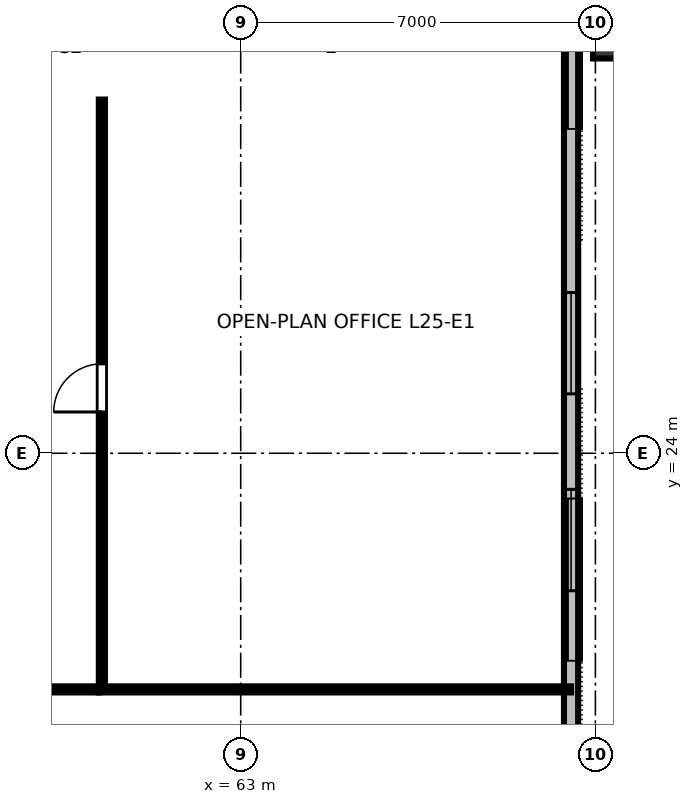
"""IFC4 building model, lengths in metres.
Left out: names, types, materials, properties, quantities, classifications, styles, units other than length and angle.
Written with IfcOpenShell. Run it as: python <this file> out.ifc"""

import sys

from ifc_helpers import new_model, si_unit, direction, frame, frame_2d, origin, origin_2d, place, context, subcontext, project, spatial, rectangle, i_section, extrude, element, fill, save


model = new_model("IFC4")
c1 = context("Model", 3, precision=1e-05, world=origin(), true_north=direction((0.0, 1.0)))
c2 = subcontext(c1, "Body", "Model", "MODEL_VIEW")
j1 = project(units=[si_unit("LENGTHUNIT", "METRE"), si_unit("PLANEANGLEUNIT", "RADIAN")], contexts=[c1])
p1 = place(None, origin())
s1 = spatial("IfcSite", under=j1, at=p1, CompositionType="ELEMENT")
p2 = place(p1, origin())
s2 = spatial("IfcBuilding", under=s1, at=p2, CompositionType="ELEMENT")
p3 = place(p2, frame((0.0, 0.0, 98.8)))
s3 = spatial("IfcBuildingStorey", under=s2, at=p3, CompositionType="ELEMENT", Elevation=98.8)
p4 = place(p3, frame((70.18, 32.0, 0.0), z_axis=(0.0, 0.0, 1.0), x_axis=(0.0, 1.0, 0.0)))
e1 = element("IfcColumn", 1, at=p4, inside=s3, PredefinedType="COLUMN", context=c2, shape_type="SweptSolid", body=[
    extrude(i_section(OverallWidth=0.418, OverallDepth=0.455, WebThickness=0.042, FlangeThickness=0.068, FilletRadius=0.025, at=origin_2d()), origin(), (0.0, 0.0, 1.0), 3.358),
])
p5 = place(p3, frame((69.52, 15.36, 0.0), z_axis=(0.0, 0.0, 1.0), x_axis=(0.0, 1.0, 0.0)))
e2 = element("IfcWall", 2, at=p5, inside=s3, PredefinedType="STANDARD", context=c2, shape_type="SweptSolid", body=[
    extrude(rectangle(XDim=33.28, YDim=0.28, at=frame_2d((16.64, 0.0))), origin(), (0.0, 0.0, 1.0), 3.36),
])
p6 = place(p5, frame((5.927, 0.0, 0.8)))
e3 = element("IfcOpeningElement", 3, at=p6, cuts=e2, PredefinedType="OPENING", context=c2, shape_type="SweptSolid", body=[
    extrude(rectangle(XDim=2.0, YDim=1.95, at=frame_2d((1.0, 0.975))), frame((0.0, 0.15, 0.0), z_axis=(0.0, -1.0, 0.0), x_axis=(1.0, 0.0, 0.0)), (0.0, 0.0, 1.0), 0.3),
])
p7 = place(p5, frame((9.812, 0.0, 0.8)))
e4 = element("IfcOpeningElement", 4, at=p7, cuts=e2, PredefinedType="OPENING", context=c2, shape_type="SweptSolid", body=[
    extrude(rectangle(XDim=2.0, YDim=1.95, at=frame_2d((1.0, 0.975))), frame((0.0, 0.15, 0.0), z_axis=(0.0, -1.0, 0.0), x_axis=(1.0, 0.0, 0.0)), (0.0, 0.0, 1.0), 0.3),
])
p8 = place(p5, frame((21.468, 0.0, 0.8)))
e5 = element("IfcOpeningElement", 5, at=p8, cuts=e2, PredefinedType="OPENING", context=c2, shape_type="SweptSolid", body=[
    extrude(rectangle(XDim=2.0, YDim=1.95, at=frame_2d((1.0, 0.975))), frame((0.0, 0.15, 0.0), z_axis=(0.0, -1.0, 0.0), x_axis=(1.0, 0.0, 0.0)), (0.0, 0.0, 1.0), 0.3),
])
p9 = place(p5, frame((25.353, 0.0, 0.8)))
e6 = element("IfcOpeningElement", 6, at=p9, cuts=e2, PredefinedType="OPENING", context=c2, shape_type="SweptSolid", body=[
    extrude(rectangle(XDim=2.0, YDim=1.95, at=frame_2d((1.0, 0.975))), frame((0.0, 0.15, 0.0), z_axis=(0.0, -1.0, 0.0), x_axis=(1.0, 0.0, 0.0)), (0.0, 0.0, 1.0), 0.3),
])
p10 = place(p3, frame((31.8, 19.34, 0.0), z_axis=(0.0, 0.0, 1.0), x_axis=(1.0, 0.0, 0.0)))
e7 = element("IfcWall", 7, at=p10, inside=s3, PredefinedType="PARTITIONING", context=c2, shape_type="SweptSolid", body=[
    extrude(rectangle(XDim=28.4, YDim=0.12, at=frame_2d((14.2, 0.0))), origin(), (0.0, 0.0, 1.0), 2.64),
])
p11 = place(p10, frame((4.201, 0.0, 0.0)))
e8 = element("IfcOpeningElement", 8, at=p11, cuts=e7, PredefinedType="OPENING", context=c2, shape_type="SweptSolid", body=[
    extrude(rectangle(XDim=0.95, YDim=2.15, at=frame_2d((0.475, 1.075))), frame((0.0, 0.07, 0.0), z_axis=(0.0, -1.0, 0.0), x_axis=(1.0, 0.0, 0.0)), (0.0, 0.0, 1.0), 0.14),
])
p12 = place(p10, frame((11.29, 0.0, 0.0)))
e9 = element("IfcOpeningElement", 9, at=p12, cuts=e7, PredefinedType="OPENING", context=c2, shape_type="SweptSolid", body=[
    extrude(rectangle(XDim=0.95, YDim=2.15, at=frame_2d((0.475, 1.075))), frame((0.0, 0.07, 0.0), z_axis=(0.0, -1.0, 0.0), x_axis=(1.0, 0.0, 0.0)), (0.0, 0.0, 1.0), 0.14),
])
p13 = place(p10, frame((17.423, 0.0, 0.0)))
e10 = element("IfcOpeningElement", 10, at=p13, cuts=e7, PredefinedType="OPENING", context=c2, shape_type="SweptSolid", body=[
    extrude(rectangle(XDim=0.95, YDim=2.15, at=frame_2d((0.475, 1.075))), frame((0.0, 0.07, 0.0), z_axis=(0.0, -1.0, 0.0), x_axis=(1.0, 0.0, 0.0)), (0.0, 0.0, 1.0), 0.14),
])
p14 = place(p10, frame((24.394, 0.0, 0.0)))
e11 = element("IfcOpeningElement", 11, at=p14, cuts=e7, PredefinedType="OPENING", context=c2, shape_type="SweptSolid", body=[
    extrude(rectangle(XDim=0.95, YDim=2.15, at=frame_2d((0.475, 1.075))), frame((0.0, 0.07, 0.0), z_axis=(0.0, -1.0, 0.0), x_axis=(1.0, 0.0, 0.0)), (0.0, 0.0, 1.0), 0.14),
])
p15 = place(p3, frame((60.26, 19.4, 0.0), z_axis=(0.0, 0.0, 1.0), x_axis=(0.0, 1.0, 0.0)))
e12 = element("IfcWall", 12, at=p15, inside=s3, PredefinedType="PARTITIONING", context=c2, shape_type="SweptSolid", body=[
    extrude(rectangle(XDim=11.58, YDim=0.12, at=frame_2d((5.79, 0.0))), origin(), (0.0, 0.0, 1.0), 2.64),
])
p16 = place(p15, frame((5.415, 0.0, 0.0)))
e13 = element("IfcOpeningElement", 13, at=p16, cuts=e12, PredefinedType="OPENING", context=c2, shape_type="SweptSolid", body=[
    extrude(rectangle(XDim=0.95, YDim=2.15, at=frame_2d((0.475, 1.075))), frame((0.0, 0.07, 0.0), z_axis=(0.0, -1.0, 0.0), x_axis=(1.0, 0.0, 0.0)), (0.0, 0.0, 1.0), 0.14),
])
p17 = place(p3, frame((60.2, 19.34, 0.0), z_axis=(0.0, 0.0, 1.0), x_axis=(1.0, 0.0, 0.0)))
e14 = element("IfcWall", 14, at=p17, inside=s3, PredefinedType="PARTITIONING", context=c2, shape_type="SweptSolid", body=[
    extrude(rectangle(XDim=9.32, YDim=0.12, at=frame_2d((4.66, 0.0))), origin(), (0.0, 0.0, 1.0), 2.64),
])
p18 = place(p6, origin())
e15 = element("IfcWindow", 15, at=p18, inside=s3, PartitioningType="SINGLE_PANEL", PredefinedType="WINDOW", context=c2, shape_type="SweptSolid", body=[
    extrude(rectangle(XDim=2.0, YDim=1.95, at=frame_2d((1.0, 0.975))), frame((0.0, 0.03, 0.0), z_axis=(0.0, -1.0, 0.0), x_axis=(1.0, 0.0, 0.0)), (0.0, 0.0, 1.0), 0.06),
])
fill(e3, e15)
p19 = place(p7, origin())
e16 = element("IfcWindow", 16, at=p19, inside=s3, PartitioningType="SINGLE_PANEL", PredefinedType="WINDOW", context=c2, shape_type="SweptSolid", body=[
    extrude(rectangle(XDim=2.0, YDim=1.95, at=frame_2d((1.0, 0.975))), frame((0.0, 0.03, 0.0), z_axis=(0.0, -1.0, 0.0), x_axis=(1.0, 0.0, 0.0)), (0.0, 0.0, 1.0), 0.06),
])
fill(e4, e16)
p20 = place(p16, origin())
e17 = element("IfcDoor", 17, at=p20, inside=s3, OperationType="SINGLE_SWING_LEFT", PredefinedType="DOOR", context=c2, shape_type="SweptSolid", body=[
    extrude(rectangle(XDim=0.95, YDim=2.15, at=frame_2d((0.475, 1.075))), frame((0.0, 0.025, 0.0), z_axis=(0.0, -1.0, 0.0), x_axis=(1.0, 0.0, 0.0)), (0.0, 0.0, 1.0), 0.05),
])
fill(e13, e17)
save(model, sys.argv[1])
